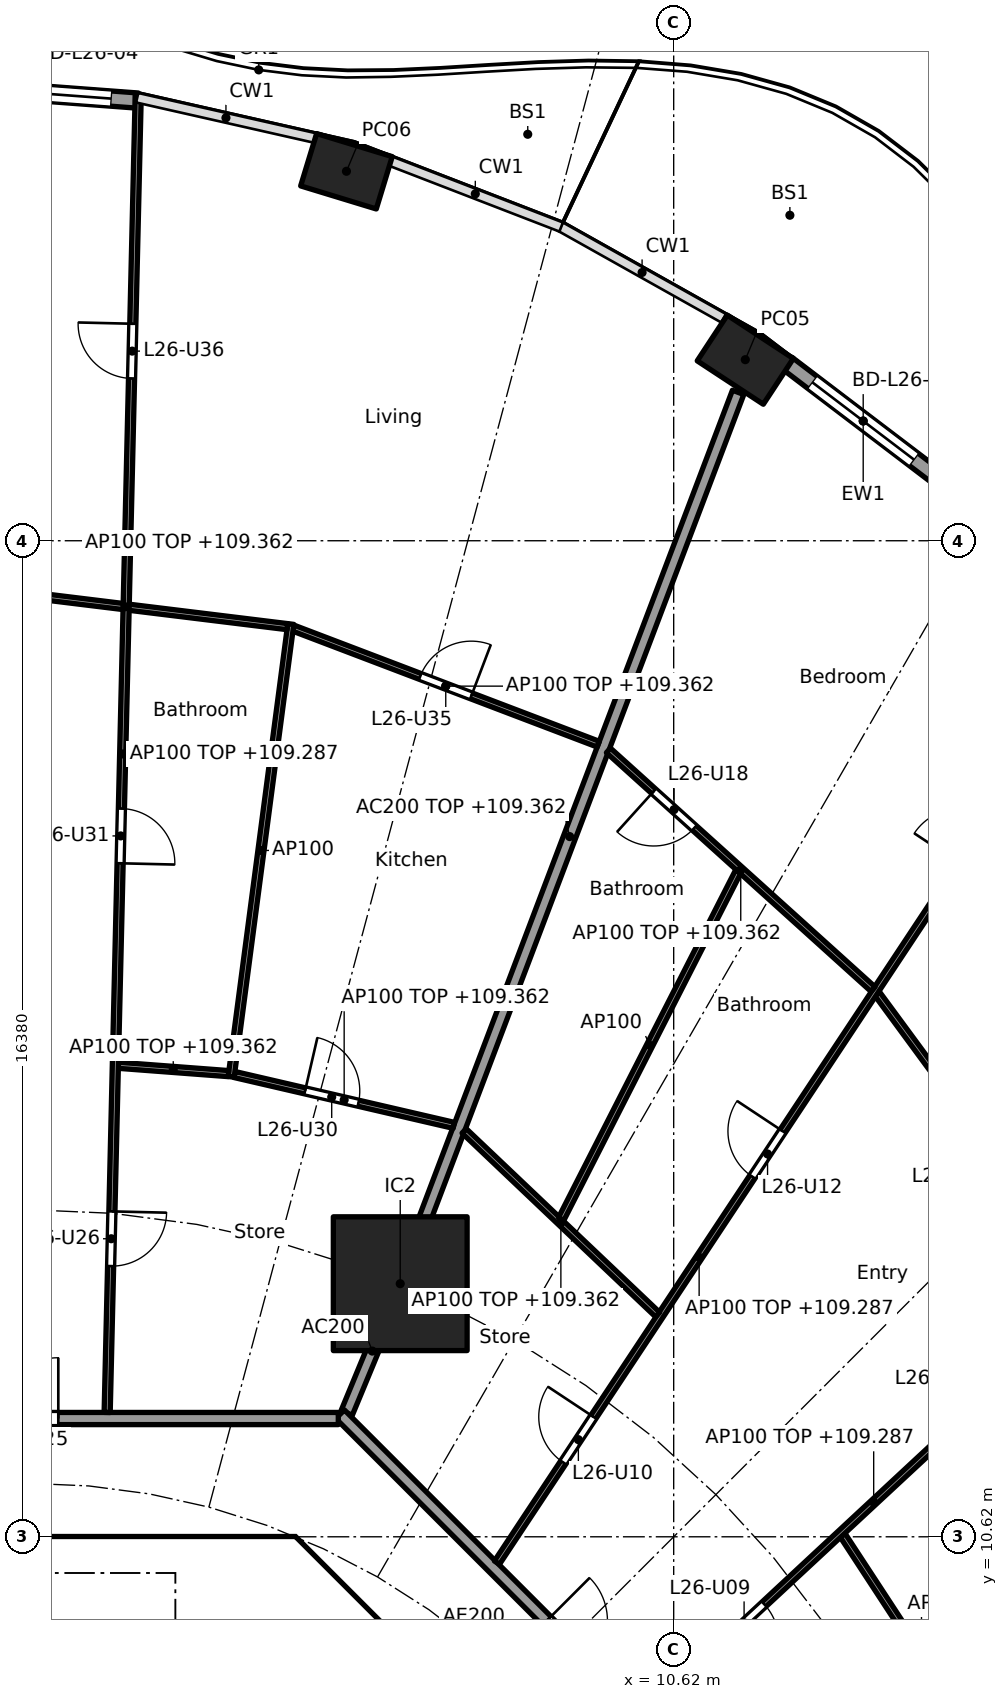
"""IFC4 building model, lengths in metres.
Left out: names, types, materials, properties, quantities, classifications, styles, units other than length and angle.
Written with IfcOpenShell. Run it as: python <this file> out.ifc"""

import sys

from ifc_helpers import new_model, si_unit, direction, frame, frame_2d, origin, origin_2d, place, context, subcontext, project, spatial, polyline, rectangle, hollow_rectangle, outline, extrude, element, fill, save


model = new_model("IFC4")
c1 = context("Model", 3, precision=1e-05, world=origin(), true_north=direction((0.0, 1.0)))
c2 = subcontext(c1, "Body", "Model", "MODEL_VIEW")
j1 = project(units=[si_unit("LENGTHUNIT", "METRE"), si_unit("PLANEANGLEUNIT", "RADIAN")], contexts=[c1])
p1 = place(None, origin())
s1 = spatial("IfcSite", under=j1, at=p1, CompositionType="ELEMENT")
p2 = place(p1, origin())
s2 = spatial("IfcBuilding", under=s1, at=p2, CompositionType="ELEMENT")
p3 = place(p2, frame((0.0, 0.0, 106.6)))
s3 = spatial("IfcBuildingStorey", under=s2, at=p3, CompositionType="ELEMENT", Elevation=106.6)
for number, where, z_axis, x_axis in (
    (1, (11.798, 29.978, 0.0), (0.0, 0.0, 1.0), (-0.836, 0.549, 0.0)),
    (2, (5.239, 33.076, 0.0), (0.0, 0.0, 1.0), (-0.957, 0.292, 0.0)),
):
    element("IfcColumn", number, at=place(p3, frame(where, z_axis=z_axis, x_axis=x_axis)), inside=s3, PredefinedType="COLUMN", context=c2, shape_type="SweptSolid", body=[
        extrude(hollow_rectangle(XDim=1.3, YDim=0.9, WallThickness=0.045, at=origin_2d()), origin(), (0.0, 0.0, 1.0), 3.7),
    ])
p4 = place(p3, frame((6.123, 14.782, 0.0), z_axis=(0.0, 0.0, 1.0), x_axis=(1.0, 0.0, 0.0)))
e3 = element("IfcColumn", 3, at=p4, inside=s3, PredefinedType="COLUMN", context=c2, shape_type="SweptSolid", body=[
    extrude(rectangle(XDim=2.2, YDim=2.2, at=origin_2d()), origin(), (0.0, 0.0, 1.0), 3.7),
])
p5 = place(p3, frame((12.489, 29.917, 0.0), z_axis=(0.0, 0.0, 1.0), x_axis=(0.796037575978, -0.605247203736, 0.0)))
e4 = element("IfcWall", 4, at=p5, inside=s3, PredefinedType="SOLIDWALL", context=c2, shape_type="SweptSolid", body=[
    extrude(rectangle(XDim=3.134, YDim=0.25, at=frame_2d((1.567, 0.0))), origin(), (0.0, 0.0, 1.0), 3.44),
])
p6 = place(p5, frame((0.517, 0.0, 0.0)))
e5 = element("IfcOpeningElement", 5, at=p6, cuts=e4, PredefinedType="OPENING", context=c2, shape_type="SweptSolid", body=[
    extrude(rectangle(XDim=2.1, YDim=2.4, at=frame_2d((1.05, 1.2))), frame((0.0, 0.135, 0.0), z_axis=(0.0, -1.0, 0.0), x_axis=(1.0, 0.0, 0.0)), (0.0, 0.0, 1.0), 0.27),
])
p7 = place(p3, frame((-1.161, 34.46, 0.0), z_axis=(0.0, 0.0, 1.0), x_axis=(0.997232262224, -0.074349278273, 0.0)))
e6 = element("IfcWall", 6, at=p7, inside=s3, PredefinedType="SOLIDWALL", context=c2, shape_type="SweptSolid", body=[
    extrude(rectangle(XDim=2.975, YDim=0.25, at=frame_2d((1.488, 0.0))), origin(), (0.0, 0.0, 1.0), 3.44),
])
p8 = place(p7, frame((0.438, 0.0, 0.0)))
e7 = element("IfcOpeningElement", 7, at=p8, cuts=e6, PredefinedType="OPENING", context=c2, shape_type="SweptSolid", body=[
    extrude(rectangle(XDim=2.1, YDim=2.4, at=frame_2d((1.05, 1.2))), frame((0.0, 0.135, 0.0), z_axis=(0.0, -1.0, 0.0), x_axis=(1.0, 0.0, 0.0)), (0.0, 0.0, 1.0), 0.27),
])
p9 = place(p3, frame((9.988, 4.613, 0.0), z_axis=(0.0, 0.0, 1.0), x_axis=(-0.707106781187, 0.707106781187, 0.0)))
e8 = element("IfcWall", 8, at=p9, inside=s3, PredefinedType="SHEAR", context=c2, shape_type="SweptSolid", body=[
    extrude(rectangle(XDim=7.602, YDim=0.6, at=frame_2d((3.801, 0.0))), origin(), (0.0, 0.0, 1.0), 3.44),
])
p10 = place(p9, frame((3.201, 0.0, 0.0)))
e9 = element("IfcOpeningElement", 9, at=p10, cuts=e8, PredefinedType="OPENING", context=c2, shape_type="SweptSolid", body=[
    extrude(rectangle(XDim=1.2, YDim=2.1, at=frame_2d((0.6, 1.05))), frame((0.0, 0.31, 0.0), z_axis=(0.0, -1.0, 0.0), x_axis=(1.0, 0.0, 0.0)), (0.0, 0.0, 1.0), 0.62),
])
p11 = place(p3, frame((4.0, 7.025, 0.0), z_axis=(0.0, 0.0, 1.0), x_axis=(0.0, 1.0, 0.0)))
e10 = element("IfcWall", 10, at=p11, inside=s3, PredefinedType="SOLIDWALL", context=c2, shape_type="SweptSolid", body=[
    extrude(rectangle(XDim=3.0, YDim=0.2, at=frame_2d((1.5, 0.0))), origin(), (0.0, 0.0, 1.0), 3.44),
])
p12 = place(p11, frame((0.925, 0.0, 0.0)))
e11 = element("IfcOpeningElement", 11, at=p12, cuts=e10, PredefinedType="OPENING", context=c2, shape_type="SweptSolid", body=[
    extrude(rectangle(XDim=1.1, YDim=2.1, at=frame_2d((0.55, 1.05))), frame((0.0, 0.11, 0.0), z_axis=(0.0, -1.0, 0.0), x_axis=(1.0, 0.0, 0.0)), (0.0, 0.0, 1.0), 0.22),
])
p13 = place(p3, origin())
e12 = element("IfcWall", 12, at=p13, inside=s3, PredefinedType="SHEAR", context=c2, shape_type="SweptSolid", body=[
    extrude(outline(polyline([(-4.152, 10.025), (-4.401, 9.776), (-4.825, 10.2), (-4.401, 10.625), (4.401, 10.625), (4.825, 10.2), (4.401, 9.776), (4.152, 10.025), (-4.152, 10.025)])), origin(), (0.0, 0.0, 1.0), 3.44),
])
p14 = place(p3, frame((5.243, 12.657, 0.0), z_axis=(0.0, 0.0, 1.0), x_axis=(0.382724096228, 0.923862687939, 0.0)))
e13 = element("IfcWall", 13, at=p14, inside=s3, PredefinedType="PARTITIONING", context=c2, shape_type="SweptSolid", body=[
    extrude(rectangle(XDim=2.201, YDim=0.2, at=frame_2d((1.1, 0.0))), origin(), (0.0, 0.0, 1.0), 3.44),
])
p15 = place(p3, frame((6.141, 14.829, 0.0), z_axis=(0.0, 0.0, 1.0), x_axis=(0.354477134193, 0.935064682968, 0.0)))
e14 = element("IfcWall", 14, at=p15, inside=s3, PredefinedType="PARTITIONING", context=c2, shape_type="SweptSolid", body=[
    extrude(rectangle(XDim=15.626, YDim=0.2, at=frame_2d((7.813, 0.0))), origin(), (0.0, 0.0, 1.0), 2.762),
])
p16 = place(p3, frame((12.635, 5.134, 0.0), z_axis=(0.0, 0.0, 1.0), x_axis=(-0.707106781187, 0.707106781187, 0.0)))
e15 = element("IfcWall", 15, at=p16, inside=s3, PredefinedType="PARTITIONING", context=c2, shape_type="SweptSolid", body=[
    extrude(rectangle(XDim=10.609, YDim=0.2, at=frame_2d((5.305, 0.0))), origin(), (0.0, 0.0, 1.0), 3.44),
])
p17 = place(p16, frame((4.804, 0.0, 0.0)))
e16 = element("IfcOpeningElement", 16, at=p17, cuts=e15, PredefinedType="OPENING", context=c2, shape_type="SweptSolid", body=[
    extrude(rectangle(XDim=1.0, YDim=2.1, at=frame_2d((0.5, 1.05))), frame((0.0, 0.11, 0.0), z_axis=(0.0, -1.0, 0.0), x_axis=(1.0, 0.0, 0.0)), (0.0, 0.0, 1.0), 0.22),
])
p18 = place(p3, frame((5.104, 12.565, 0.0), z_axis=(0.0, 0.0, 1.0), x_axis=(-1.0, 0.0, 0.0)))
e17 = element("IfcWall", 17, at=p18, inside=s3, PredefinedType="PARTITIONING", context=c2, shape_type="SweptSolid", body=[
    extrude(rectangle(XDim=10.409, YDim=0.2, at=frame_2d((5.205, 0.0))), origin(), (0.0, 0.0, 1.0), 3.44),
])
p19 = place(p18, frame((4.604, 0.0, 0.0)))
e18 = element("IfcOpeningElement", 18, at=p19, cuts=e17, PredefinedType="OPENING", context=c2, shape_type="SweptSolid", body=[
    extrude(rectangle(XDim=1.0, YDim=2.1, at=frame_2d((0.5, 1.05))), frame((0.0, 0.11, 0.0), z_axis=(0.0, -1.0, 0.0), x_axis=(1.0, 0.0, 0.0)), (0.0, 0.0, 1.0), 0.22),
])
p20 = place(p3, frame((15.992, 6.68, 0.0), z_axis=(0.0, 0.0, 1.0), x_axis=(-0.547472878942, 0.836823426311, 0.0)))
e19 = element("IfcWall", 19, at=p20, inside=s3, PredefinedType="PARTITIONING", context=c2, shape_type="SweptSolid", body=[
    extrude(rectangle(XDim=4.738, YDim=0.1, at=frame_2d((2.369, 0.0))), origin(), (0.0, 0.0, 1.0), 2.762),
])
p21 = place(p3, frame((10.185, 7.726, 0.0), z_axis=(0.0, 0.0, 1.0), x_axis=(0.732598472978, 0.680661059112, 0.0)))
e20 = element("IfcWall", 20, at=p21, inside=s3, PredefinedType="PARTITIONING", context=c2, shape_type="SweptSolid", body=[
    extrude(rectangle(XDim=10.167, YDim=0.1, at=frame_2d((5.084, 0.0))), origin(), (0.0, 0.0, 1.0), 2.687),
])
p22 = place(p21, frame((1.725, 0.0, 0.0)))
e21 = element("IfcOpeningElement", 21, at=p22, cuts=e20, PredefinedType="OPENING", context=c2, shape_type="SweptSolid", body=[
    extrude(rectangle(XDim=0.9, YDim=2.1, at=frame_2d((0.45, 1.05))), frame((0.0, 0.06, 0.0), z_axis=(0.0, -1.0, 0.0), x_axis=(1.0, 0.0, 0.0)), (0.0, 0.0, 1.0), 0.12),
])
p23 = place(p21, frame((6.784, 0.0, 0.0)))
e22 = element("IfcOpeningElement", 22, at=p23, cuts=e20, PredefinedType="OPENING", context=c2, shape_type="SweptSolid", body=[
    extrude(rectangle(XDim=0.9, YDim=2.1, at=frame_2d((0.45, 1.05))), frame((0.0, 0.06, 0.0), z_axis=(0.0, -1.0, 0.0), x_axis=(1.0, 0.0, 0.0)), (0.0, 0.0, 1.0), 0.12),
])
p24 = place(p3, frame((17.567, 14.653, 0.0), z_axis=(0.0, 0.0, 1.0), x_axis=(-0.592391983588, 0.80564988536, 0.0)))
e23 = element("IfcWall", 23, at=p24, inside=s3, PredefinedType="PARTITIONING", context=c2, shape_type="SweptSolid", body=[
    extrude(rectangle(XDim=6.08, YDim=0.1, at=frame_2d((3.04, 0.0))), origin(), (0.0, 0.0, 1.0), 2.762),
])
p25 = place(p24, frame((2.59, 0.0, 0.0)))
e24 = element("IfcOpeningElement", 24, at=p25, cuts=e23, PredefinedType="OPENING", context=c2, shape_type="SweptSolid", body=[
    extrude(rectangle(XDim=0.9, YDim=2.1, at=frame_2d((0.45, 1.05))), frame((0.0, 0.06, 0.0), z_axis=(0.0, -1.0, 0.0), x_axis=(1.0, 0.0, 0.0)), (0.0, 0.0, 1.0), 0.12),
])
p26 = place(p3, frame((7.713, 10.195, 0.0), z_axis=(0.0, 0.0, 1.0), x_axis=(0.552111071171, 0.833770571015, 0.0)))
e25 = element("IfcWall", 25, at=p26, inside=s3, PredefinedType="PARTITIONING", context=c2, shape_type="SweptSolid", body=[
    extrude(rectangle(XDim=17.208, YDim=0.1, at=frame_2d((8.604, 0.0))), origin(), (0.0, 0.0, 1.0), 2.687),
])
p27 = place(p26, frame((1.976, 0.0, 0.0)))
e26 = element("IfcOpeningElement", 26, at=p27, cuts=e25, PredefinedType="OPENING", context=c2, shape_type="SweptSolid", body=[
    extrude(rectangle(XDim=0.9, YDim=2.1, at=frame_2d((0.45, 1.05))), frame((0.0, 0.06, 0.0), z_axis=(0.0, -1.0, 0.0), x_axis=(1.0, 0.0, 0.0)), (0.0, 0.0, 1.0), 0.12),
])
p28 = place(p26, frame((7.611, 0.0, 0.0)))
e27 = element("IfcOpeningElement", 27, at=p28, cuts=e25, PredefinedType="OPENING", context=c2, shape_type="SweptSolid", body=[
    extrude(rectangle(XDim=0.9, YDim=2.1, at=frame_2d((0.45, 1.05))), frame((0.0, 0.06, 0.0), z_axis=(0.0, -1.0, 0.0), x_axis=(1.0, 0.0, 0.0)), (0.0, 0.0, 1.0), 0.12),
])
p29 = place(p26, frame((13.79, 0.0, 0.0)))
e28 = element("IfcOpeningElement", 28, at=p29, cuts=e25, PredefinedType="OPENING", context=c2, shape_type="SweptSolid", body=[
    extrude(rectangle(XDim=0.9, YDim=2.1, at=frame_2d((0.45, 1.05))), frame((0.0, 0.06, 0.0), z_axis=(0.0, -1.0, 0.0), x_axis=(1.0, 0.0, 0.0)), (0.0, 0.0, 1.0), 0.12),
])
p30 = place(p3, frame((10.355, 14.274, 0.0), z_axis=(0.0, 0.0, 1.0), x_axis=(-0.725206433622, 0.688531501555, 0.0)))
e29 = element("IfcWall", 29, at=p30, inside=s3, PredefinedType="PARTITIONING", context=c2, shape_type="SweptSolid", body=[
    extrude(rectangle(XDim=4.387, YDim=0.1, at=frame_2d((2.193, 0.0))), origin(), (0.0, 0.0, 1.0), 2.762),
])
p31 = place(p3, frame((13.898, 19.625, 0.0), z_axis=(0.0, 0.0, 1.0), x_axis=(-0.742396654702, 0.669960601146, 0.0)))
e30 = element("IfcWall", 30, at=p31, inside=s3, PredefinedType="PARTITIONING", context=c2, shape_type="SweptSolid", body=[
    extrude(rectangle(XDim=5.861, YDim=0.1, at=frame_2d((2.931, 0.0))), origin(), (0.0, 0.0, 1.0), 2.762),
])
p32 = place(p31, frame((3.958, 0.0, 0.0)))
e31 = element("IfcOpeningElement", 31, at=p32, cuts=e30, PredefinedType="OPENING", context=c2, shape_type="SweptSolid", body=[
    extrude(rectangle(XDim=0.9, YDim=2.1, at=frame_2d((0.45, 1.05))), frame((0.0, 0.06, 0.0), z_axis=(0.0, -1.0, 0.0), x_axis=(1.0, 0.0, 0.0)), (0.0, 0.0, 1.0), 0.12),
])
p33 = place(p3, frame((8.769, 15.846, 0.0), z_axis=(0.0, 0.0, 1.0), x_axis=(0.454067187552, 0.890967445639, 0.0)))
e32 = element("IfcWall", 32, at=p33, inside=s3, PredefinedType="PARTITIONING", context=c2, shape_type="SweptSolid", body=[
    extrude(rectangle(XDim=6.414, YDim=0.1, at=frame_2d((3.207, 0.0))), origin(), (0.0, 0.0, 1.0), 3.44),
])
p34 = place(p3, frame((7.004, 17.386, 0.0), z_axis=(0.0, 0.0, 1.0), x_axis=(-0.974172890163, 0.22580341023, 0.0)))
e33 = element("IfcWall", 33, at=p34, inside=s3, PredefinedType="PARTITIONING", context=c2, shape_type="SweptSolid", body=[
    extrude(rectangle(XDim=3.702, YDim=0.1, at=frame_2d((1.851, 0.0))), origin(), (0.0, 0.0, 1.0), 2.762),
])
p35 = place(p34, frame((1.611, 0.0, 0.0)))
e34 = element("IfcOpeningElement", 34, at=p35, cuts=e33, PredefinedType="OPENING", context=c2, shape_type="SweptSolid", body=[
    extrude(rectangle(XDim=0.9, YDim=2.1, at=frame_2d((0.45, 1.05))), frame((0.0, 0.06, 0.0), z_axis=(0.0, -1.0, 0.0), x_axis=(1.0, 0.0, 0.0)), (0.0, 0.0, 1.0), 0.12),
])
p36 = place(p3, frame((9.379, 23.655, 0.0), z_axis=(0.0, 0.0, 1.0), x_axis=(-0.934613076136, 0.355666132653, 0.0)))
e35 = element("IfcWall", 35, at=p36, inside=s3, PredefinedType="PARTITIONING", context=c2, shape_type="SweptSolid", body=[
    extrude(rectangle(XDim=5.366, YDim=0.1, at=frame_2d((2.683, 0.0))), origin(), (0.0, 0.0, 1.0), 2.762),
])
p37 = place(p36, frame((2.233, 0.0, 0.0)))
e36 = element("IfcOpeningElement", 36, at=p37, cuts=e35, PredefinedType="OPENING", context=c2, shape_type="SweptSolid", body=[
    extrude(rectangle(XDim=0.9, YDim=2.1, at=frame_2d((0.45, 1.05))), frame((0.0, 0.06, 0.0), z_axis=(0.0, -1.0, 0.0), x_axis=(1.0, 0.0, 0.0)), (0.0, 0.0, 1.0), 0.12),
])
p38 = place(p3, frame((3.343, 18.184, 0.0), z_axis=(0.0, 0.0, 1.0), x_axis=(0.130596603503, 0.991435589009, 0.0)))
e37 = element("IfcWall", 37, at=p38, inside=s3, PredefinedType="PARTITIONING", context=c2, shape_type="SweptSolid", body=[
    extrude(rectangle(XDim=7.511, YDim=0.1, at=frame_2d((3.756, 0.0))), origin(), (0.0, 0.0, 1.0), 3.44),
])
p39 = place(p3, frame((3.299, 18.237, 0.0), z_axis=(0.0, 0.0, 1.0), x_axis=(-0.997152920483, 0.075405922664, 0.0)))
e38 = element("IfcWall", 38, at=p39, inside=s3, PredefinedType="PARTITIONING", context=c2, shape_type="SweptSolid", body=[
    extrude(rectangle(XDim=1.823, YDim=0.1, at=frame_2d((0.911, 0.0))), origin(), (0.0, 0.0, 1.0), 2.762),
])
p40 = place(p3, frame((4.267, 25.587, 0.0), z_axis=(0.0, 0.0, 1.0), x_axis=(-0.992576206119, 0.121624319302, 0.0)))
e39 = element("IfcWall", 39, at=p40, inside=s3, PredefinedType="PARTITIONING", context=c2, shape_type="SweptSolid", body=[
    extrude(rectangle(XDim=5.374, YDim=0.1, at=frame_2d((2.687, 0.0))), origin(), (0.0, 0.0, 1.0), 2.762),
])
p41 = place(p3, frame((1.303, 12.665, 0.0), z_axis=(0.0, 0.0, 1.0), x_axis=(0.023564110689, 0.999722327793, 0.0)))
e40 = element("IfcWall", 40, at=p41, inside=s3, PredefinedType="PARTITIONING", context=c2, shape_type="SweptSolid", body=[
    extrude(rectangle(XDim=21.664, YDim=0.1, at=frame_2d((10.832, 0.0))), origin(), (0.0, 0.0, 1.0), 2.687),
])
p42 = place(p41, frame((2.407, 0.0, 0.0)))
e41 = element("IfcOpeningElement", 41, at=p42, cuts=e40, PredefinedType="OPENING", context=c2, shape_type="SweptSolid", body=[
    extrude(rectangle(XDim=0.9, YDim=2.1, at=frame_2d((0.45, 1.05))), frame((0.0, 0.06, 0.0), z_axis=(0.0, -1.0, 0.0), x_axis=(1.0, 0.0, 0.0)), (0.0, 0.0, 1.0), 0.12),
])
p43 = place(p41, frame((9.034, 0.0, 0.0)))
e42 = element("IfcOpeningElement", 42, at=p43, cuts=e40, PredefinedType="OPENING", context=c2, shape_type="SweptSolid", body=[
    extrude(rectangle(XDim=0.9, YDim=2.1, at=frame_2d((0.45, 1.05))), frame((0.0, 0.06, 0.0), z_axis=(0.0, -1.0, 0.0), x_axis=(1.0, 0.0, 0.0)), (0.0, 0.0, 1.0), 0.12),
])
p44 = place(p41, frame((17.009, 0.0, 0.0)))
e43 = element("IfcOpeningElement", 43, at=p44, cuts=e40, PredefinedType="OPENING", context=c2, shape_type="SweptSolid", body=[
    extrude(rectangle(XDim=0.9, YDim=2.1, at=frame_2d((0.45, 1.05))), frame((0.0, 0.06, 0.0), z_axis=(0.0, -1.0, 0.0), x_axis=(1.0, 0.0, 0.0)), (0.0, 0.0, 1.0), 0.12),
])
p45 = place(p6, origin())
e44 = element("IfcDoor", 44, at=p45, inside=s3, OperationType="SLIDING_TO_LEFT", PredefinedType="DOOR", context=c2, shape_type="SweptSolid", body=[
    extrude(rectangle(XDim=2.1, YDim=2.4, at=frame_2d((1.05, 1.2))), frame((0.0, 0.025, 0.0), z_axis=(0.0, -1.0, 0.0), x_axis=(1.0, 0.0, 0.0)), (0.0, 0.0, 1.0), 0.05),
])
fill(e5, e44)
p46 = place(p8, origin())
e45 = element("IfcDoor", 45, at=p46, inside=s3, OperationType="SLIDING_TO_LEFT", PredefinedType="DOOR", context=c2, shape_type="SweptSolid", body=[
    extrude(rectangle(XDim=2.1, YDim=2.4, at=frame_2d((1.05, 1.2))), frame((0.0, 0.025, 0.0), z_axis=(0.0, -1.0, 0.0), x_axis=(1.0, 0.0, 0.0)), (0.0, 0.0, 1.0), 0.05),
])
fill(e7, e45)
p47 = place(p22, frame((0.9, 0.0, 0.0), x_axis=(-1.0, 0.0, 0.0)))
e46 = element("IfcDoor", 46, at=p47, inside=s3, OperationType="SINGLE_SWING_RIGHT", PredefinedType="DOOR", context=c2, shape_type="SweptSolid", body=[
    extrude(rectangle(XDim=0.9, YDim=2.1, at=frame_2d((0.45, 1.05))), frame((0.0, 0.025, 0.0), z_axis=(0.0, -1.0, 0.0), x_axis=(1.0, 0.0, 0.0)), (0.0, 0.0, 1.0), 0.05),
])
fill(e21, e46)
p48 = place(p27, origin())
e47 = element("IfcDoor", 47, at=p48, inside=s3, OperationType="SINGLE_SWING_RIGHT", PredefinedType="DOOR", context=c2, shape_type="SweptSolid", body=[
    extrude(rectangle(XDim=0.9, YDim=2.1, at=frame_2d((0.45, 1.05))), frame((0.0, 0.025, 0.0), z_axis=(0.0, -1.0, 0.0), x_axis=(1.0, 0.0, 0.0)), (0.0, 0.0, 1.0), 0.05),
])
fill(e26, e47)
p49 = place(p28, origin())
e48 = element("IfcDoor", 48, at=p49, inside=s3, OperationType="SINGLE_SWING_RIGHT", PredefinedType="DOOR", context=c2, shape_type="SweptSolid", body=[
    extrude(rectangle(XDim=0.9, YDim=2.1, at=frame_2d((0.45, 1.05))), frame((0.0, 0.025, 0.0), z_axis=(0.0, -1.0, 0.0), x_axis=(1.0, 0.0, 0.0)), (0.0, 0.0, 1.0), 0.05),
])
fill(e27, e48)
p50 = place(p32, origin())
e49 = element("IfcDoor", 49, at=p50, inside=s3, OperationType="SINGLE_SWING_RIGHT", PredefinedType="DOOR", context=c2, shape_type="SweptSolid", body=[
    extrude(rectangle(XDim=0.9, YDim=2.1, at=frame_2d((0.45, 1.05))), frame((0.0, 0.025, 0.0), z_axis=(0.0, -1.0, 0.0), x_axis=(1.0, 0.0, 0.0)), (0.0, 0.0, 1.0), 0.05),
])
fill(e31, e49)
p51 = place(p19, frame((1.0, 0.0, 0.0), x_axis=(-1.0, 0.0, 0.0)))
e50 = element("IfcDoor", 50, at=p51, inside=s3, OperationType="SINGLE_SWING_RIGHT", PredefinedType="DOOR", context=c2, shape_type="SweptSolid", body=[
    extrude(rectangle(XDim=1.0, YDim=2.1, at=frame_2d((0.5, 1.05))), frame((0.0, 0.025, 0.0), z_axis=(0.0, -1.0, 0.0), x_axis=(1.0, 0.0, 0.0)), (0.0, 0.0, 1.0), 0.05),
])
fill(e18, e50)
p52 = place(p42, frame((0.9, 0.0, 0.0), x_axis=(-1.0, 0.0, 0.0)))
e51 = element("IfcDoor", 51, at=p52, inside=s3, OperationType="SINGLE_SWING_LEFT", PredefinedType="DOOR", context=c2, shape_type="SweptSolid", body=[
    extrude(rectangle(XDim=0.9, YDim=2.1, at=frame_2d((0.45, 1.05))), frame((0.0, 0.025, 0.0), z_axis=(0.0, -1.0, 0.0), x_axis=(1.0, 0.0, 0.0)), (0.0, 0.0, 1.0), 0.05),
])
fill(e41, e51)
p53 = place(p35, frame((0.9, 0.0, 0.0), x_axis=(-1.0, 0.0, 0.0)))
e52 = element("IfcDoor", 52, at=p53, inside=s3, OperationType="SINGLE_SWING_LEFT", PredefinedType="DOOR", context=c2, shape_type="SweptSolid", body=[
    extrude(rectangle(XDim=0.9, YDim=2.1, at=frame_2d((0.45, 1.05))), frame((0.0, 0.025, 0.0), z_axis=(0.0, -1.0, 0.0), x_axis=(1.0, 0.0, 0.0)), (0.0, 0.0, 1.0), 0.05),
])
fill(e34, e52)
p54 = place(p43, frame((0.9, 0.0, 0.0), x_axis=(-1.0, 0.0, 0.0)))
e53 = element("IfcDoor", 53, at=p54, inside=s3, OperationType="SINGLE_SWING_RIGHT", PredefinedType="DOOR", context=c2, shape_type="SweptSolid", body=[
    extrude(rectangle(XDim=0.9, YDim=2.1, at=frame_2d((0.45, 1.05))), frame((0.0, 0.025, 0.0), z_axis=(0.0, -1.0, 0.0), x_axis=(1.0, 0.0, 0.0)), (0.0, 0.0, 1.0), 0.05),
])
fill(e42, e53)
p55 = place(p37, frame((0.9, 0.0, 0.0), x_axis=(-1.0, 0.0, 0.0)))
e54 = element("IfcDoor", 54, at=p55, inside=s3, OperationType="SINGLE_SWING_RIGHT", PredefinedType="DOOR", context=c2, shape_type="SweptSolid", body=[
    extrude(rectangle(XDim=0.9, YDim=2.1, at=frame_2d((0.45, 1.05))), frame((0.0, 0.025, 0.0), z_axis=(0.0, -1.0, 0.0), x_axis=(1.0, 0.0, 0.0)), (0.0, 0.0, 1.0), 0.05),
])
fill(e36, e54)
p56 = place(p44, origin())
e55 = element("IfcDoor", 55, at=p56, inside=s3, OperationType="SINGLE_SWING_RIGHT", PredefinedType="DOOR", context=c2, shape_type="SweptSolid", body=[
    extrude(rectangle(XDim=0.9, YDim=2.1, at=frame_2d((0.45, 1.05))), frame((0.0, 0.025, 0.0), z_axis=(0.0, -1.0, 0.0), x_axis=(1.0, 0.0, 0.0)), (0.0, 0.0, 1.0), 0.05),
])
fill(e43, e55)
save(model, sys.argv[1])
